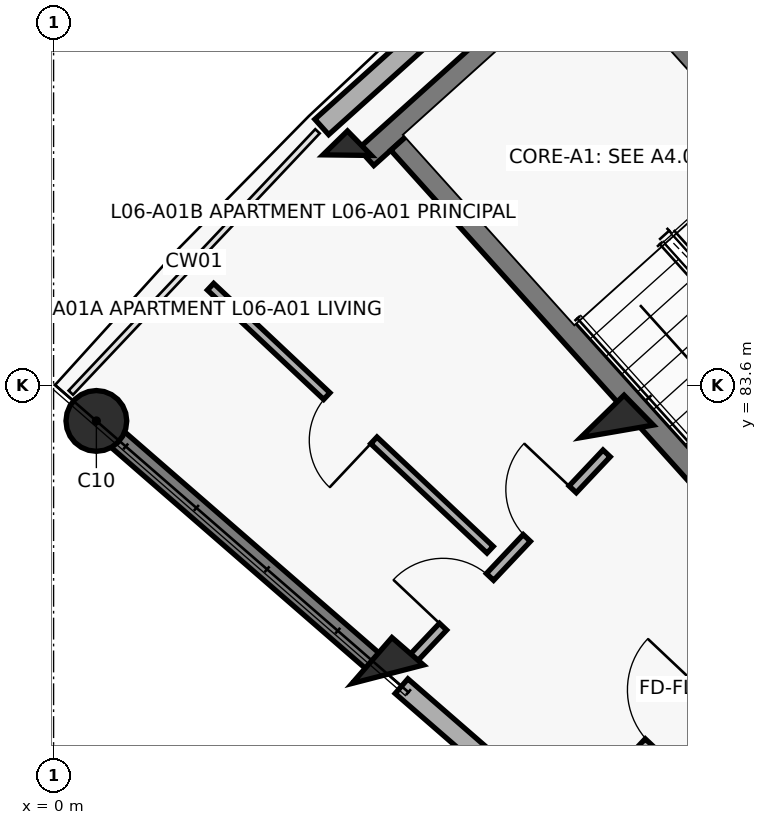
"""IFC4 building model, lengths in metres.
Left out: names, types, materials, properties, quantities, classifications, styles, units other than length and angle.
Written with IfcOpenShell. Run it as: python <this file> out.ifc"""

import sys

from ifc_helpers import new_model, si_unit, direction, frame, frame_2d, origin, origin_2d, place, context, subcontext, project, spatial, rectangle, circle, extrude, element, fill, save


model = new_model("IFC4")
c1 = context("Model", 3, precision=1e-05, world=origin(), true_north=direction((0.0, 1.0)))
c2 = subcontext(c1, "Body", "Model", "MODEL_VIEW")
j1 = project(units=[si_unit("LENGTHUNIT", "METRE"), si_unit("PLANEANGLEUNIT", "RADIAN")], contexts=[c1])
p1 = place(None, origin())
s1 = spatial("IfcSite", under=j1, at=p1, CompositionType="ELEMENT")
p2 = place(p1, origin())
s2 = spatial("IfcBuilding", under=s1, at=p2, CompositionType="ELEMENT")
p3 = place(p2, frame((0.0, 0.0, 20.5)))
s3 = spatial("IfcBuildingStorey", under=s2, at=p3, CompositionType="ELEMENT", Elevation=20.5)
p4 = place(p3, frame((4.397, 79.796, 0.0), z_axis=(0.0, 0.0, 1.0), x_axis=(-0.754709580223, 0.656059028991, 0.0)))
e1 = element("IfcColumn", 1, at=p4, inside=s3, PredefinedType="COLUMN", context=c2, shape_type="SweptSolid", body=[
    extrude(rectangle(XDim=0.55, YDim=0.8, at=origin_2d()), origin(), (0.0, 0.0, 1.0), 3.1),
])
p5 = place(p3, frame((0.563, 83.129, 0.0), z_axis=(0.0, 0.0, 1.0), x_axis=(-0.754709580223, 0.656059028991, 0.0)))
e2 = element("IfcColumn", 2, at=p5, inside=s3, PredefinedType="COLUMN", context=c2, shape_type="SweptSolid", body=[
    extrude(circle(Radius=0.4, at=origin_2d()), origin(), (0.0, 0.0, 1.0), 3.1),
])
p6 = place(p3, frame((7.412, 82.991, 0.0), z_axis=(0.0, 0.0, 1.0), x_axis=(-0.698665066769, 0.715448897181, 0.0)))
e3 = element("IfcColumn", 3, at=p6, inside=s3, PredefinedType="COLUMN", context=c2, shape_type="SweptSolid", body=[
    extrude(rectangle(XDim=0.55, YDim=0.8, at=origin_2d()), origin(), (0.0, 0.0, 1.0), 3.1),
])
p7 = place(p3, frame((3.863, 86.626, 0.0), z_axis=(0.0, 0.0, 1.0), x_axis=(-0.698665066769, 0.715448897181, 0.0)))
e4 = element("IfcColumn", 4, at=p7, inside=s3, PredefinedType="COLUMN", context=c2, shape_type="SweptSolid", body=[
    extrude(rectangle(XDim=0.45, YDim=0.45, at=origin_2d()), origin(), (0.0, 0.0, 1.0), 3.1),
])
p8 = place(p3, frame((4.261, 79.914, 0.0), z_axis=(0.0, 0.0, 1.0), x_axis=(-0.754703505217, 0.65606601742, 0.0)))
e5 = element("IfcWall", 5, at=p8, inside=s3, PredefinedType="SHEAR", context=c2, shape_type="SweptSolid", body=[
    extrude(rectangle(XDim=4.72, YDim=0.27, at=frame_2d((2.36, 0.0))), origin(), (0.0, 0.0, 1.0), 2.86),
])
p9 = place(p3, frame((3.528, 86.997, 0.0), z_axis=(0.0, 0.0, 1.0), x_axis=(0.743387539862, 0.668860946369, 0.0)))
e6 = element("IfcWall", 6, at=p9, inside=s3, PredefinedType="SOLIDWALL", context=c2, shape_type="SweptSolid", body=[
    extrude(rectangle(XDim=4.809, YDim=0.272, at=frame_2d((2.405, 0.0))), origin(), (0.0, 0.0, 1.0), 2.25),
])
p10 = place(p3, frame((10.766, 74.259, 0.0), z_axis=(0.0, 0.0, 1.0), x_axis=(-0.754717680958, 0.656049710044, 0.0)))
e7 = element("IfcWall", 7, at=p10, inside=s3, PredefinedType="SOLIDWALL", context=c2, shape_type="SweptSolid", body=[
    extrude(rectangle(XDim=8.2, YDim=0.255, at=frame_2d((4.1, 0.0))), origin(), (0.0, 0.0, 1.0), 2.18),
])
p11 = place(p10, frame((3.59, 0.0, 0.75)))
e8 = element("IfcOpeningElement", 8, at=p11, cuts=e7, PredefinedType="OPENING", context=c2, shape_type="SweptSolid", body=[
    extrude(rectangle(XDim=1.35, YDim=1.35, at=frame_2d((0.675, 0.675))), frame((0.0, 0.137, 0.0), z_axis=(0.0, -1.0, 0.0), x_axis=(1.0, 0.0, 0.0)), (0.0, 0.0, 1.0), 0.275),
])
p12 = place(p3, frame((7.436, 89.59, 0.0), z_axis=(0.0, 0.0, 1.0), x_axis=(-0.743400052815, -0.668847038922, 0.0)))
e9 = element("IfcWall", 9, at=p12, inside=s3, PredefinedType="SHEAR", context=c2, shape_type="SweptSolid", body=[
    extrude(rectangle(XDim=4.47, YDim=0.3, at=frame_2d((2.235, 0.0))), origin(), (0.0, 0.0, 1.0), 3.1),
])
p13 = place(p3, frame((12.345, 83.461, 0.0), z_axis=(0.0, 0.0, 1.0), x_axis=(-0.668868253964, 0.743380964808, 0.0)))
e10 = element("IfcWall", 10, at=p13, inside=s3, PredefinedType="SHEAR", context=c2, shape_type="SweptSolid", body=[
    extrude(rectangle(XDim=7.69, YDim=0.3, at=frame_2d((3.845, 0.0))), origin(), (0.0, 0.0, 1.0), 3.1),
])
p14 = place(p3, frame((9.691, 81.073, 0.0), z_axis=(0.0, 0.0, 1.0), x_axis=(-0.668885797871, 0.743365179038, 0.0)))
e11 = element("IfcWall", 11, at=p14, inside=s3, PredefinedType="SHEAR", context=c2, shape_type="SweptSolid", body=[
    extrude(rectangle(XDim=7.69, YDim=0.3, at=frame_2d((3.845, 0.0))), origin(), (0.0, 0.0, 1.0), 3.1),
])
p15 = place(p3, frame((7.014, 77.984, 0.0), z_axis=(0.0, 0.0, 1.0), x_axis=(0.686310507227, 0.727308660522, 0.0)))
e12 = element("IfcWall", 12, at=p15, inside=s3, PredefinedType="SOLIDWALL", context=c2, shape_type="SweptSolid", body=[
    extrude(rectangle(XDim=3.436, YDim=0.2, at=frame_2d((1.718, 0.0))), origin(), (0.0, 0.0, 1.0), 2.08),
])
p16 = place(p15, frame((1.228, 0.0, 0.0)))
e13 = element("IfcOpeningElement", 13, at=p16, cuts=e12, PredefinedType="OPENING", context=c2, shape_type="SweptSolid", body=[
    extrude(rectangle(XDim=0.98, YDim=2.15, at=frame_2d((0.49, 1.075))), frame((0.0, 0.11, 0.0), z_axis=(0.0, -1.0, 0.0), x_axis=(1.0, 0.0, 0.0)), (0.0, 0.0, 1.0), 0.22),
])
p17 = place(p3, frame((4.678, 79.948, 0.0), z_axis=(0.0, 0.0, 1.0), x_axis=(0.686331812627, 0.72728855551, 0.0)))
e14 = element("IfcWall", 14, at=p17, inside=s3, PredefinedType="PARTITIONING", context=c2, shape_type="SweptSolid", body=[
    extrude(rectangle(XDim=3.785, YDim=0.13, at=frame_2d((1.893, 0.0))), origin(), (0.0, 0.0, 1.0), 2.08),
])
p18 = place(p17, frame((0.65, 0.0, 0.0)))
e15 = element("IfcOpeningElement", 15, at=p18, cuts=e14, PredefinedType="OPENING", context=c2, shape_type="SweptSolid", body=[
    extrude(rectangle(XDim=0.9, YDim=2.1, at=frame_2d((0.45, 1.05))), frame((0.0, 0.075, 0.0), z_axis=(0.0, -1.0, 0.0), x_axis=(1.0, 0.0, 0.0)), (0.0, 0.0, 1.0), 0.15),
])
p19 = place(p17, frame((2.255, 0.0, 0.0)))
e16 = element("IfcOpeningElement", 16, at=p19, cuts=e14, PredefinedType="OPENING", context=c2, shape_type="SweptSolid", body=[
    extrude(rectangle(XDim=0.88, YDim=2.1, at=frame_2d((0.44, 1.05))), frame((0.0, 0.075, 0.0), z_axis=(0.0, -1.0, 0.0), x_axis=(1.0, 0.0, 0.0)), (0.0, 0.0, 1.0), 0.15),
])
p20 = place(p3, frame((5.743, 81.434, 0.0), z_axis=(0.0, 0.0, 1.0), x_axis=(-0.72831636485, 0.685241032551, 0.0)))
e17 = element("IfcWall", 17, at=p20, inside=s3, PredefinedType="PARTITIONING", context=c2, shape_type="SweptSolid", body=[
    extrude(rectangle(XDim=5.05, YDim=0.12, at=frame_2d((2.525, 0.0))), origin(), (0.0, 0.0, 1.0), 2.08),
])
p21 = place(p20, frame((2.1, 0.0, 0.0)))
e18 = element("IfcOpeningElement", 18, at=p21, cuts=e17, PredefinedType="OPENING", context=c2, shape_type="SweptSolid", body=[
    extrude(rectangle(XDim=0.85, YDim=2.1, at=frame_2d((0.425, 1.05))), frame((0.0, 0.07, 0.0), z_axis=(0.0, -1.0, 0.0), x_axis=(1.0, 0.0, 0.0)), (0.0, 0.0, 1.0), 0.14),
])
p22 = place(p16, origin())
e19 = element("IfcDoor", 19, at=p22, inside=s3, OperationType="SINGLE_SWING_RIGHT", PredefinedType="DOOR", context=c2, shape_type="SweptSolid", body=[
    extrude(rectangle(XDim=0.98, YDim=2.15, at=frame_2d((0.49, 1.075))), frame((0.0, 0.025, 0.0), z_axis=(0.0, -1.0, 0.0), x_axis=(1.0, 0.0, 0.0)), (0.0, 0.0, 1.0), 0.05),
])
fill(e13, e19)
p23 = place(p18, origin())
e20 = element("IfcDoor", 20, at=p23, inside=s3, OperationType="SINGLE_SWING_LEFT", PredefinedType="DOOR", context=c2, shape_type="SweptSolid", body=[
    extrude(rectangle(XDim=0.9, YDim=2.1, at=frame_2d((0.45, 1.05))), frame((0.0, 0.025, 0.0), z_axis=(0.0, -1.0, 0.0), x_axis=(1.0, 0.0, 0.0)), (0.0, 0.0, 1.0), 0.05),
])
fill(e15, e20)
p24 = place(p19, origin())
e21 = element("IfcDoor", 21, at=p24, inside=s3, OperationType="SINGLE_SWING_RIGHT", PredefinedType="DOOR", context=c2, shape_type="SweptSolid", body=[
    extrude(rectangle(XDim=0.88, YDim=2.1, at=frame_2d((0.44, 1.05))), frame((0.0, 0.025, 0.0), z_axis=(0.0, -1.0, 0.0), x_axis=(1.0, 0.0, 0.0)), (0.0, 0.0, 1.0), 0.05),
])
fill(e16, e21)
p25 = place(p21, origin())
e22 = element("IfcDoor", 22, at=p25, inside=s3, OperationType="SINGLE_SWING_LEFT", PredefinedType="DOOR", context=c2, shape_type="SweptSolid", body=[
    extrude(rectangle(XDim=0.85, YDim=2.1, at=frame_2d((0.425, 1.05))), frame((0.0, 0.025, 0.0), z_axis=(0.0, -1.0, 0.0), x_axis=(1.0, 0.0, 0.0)), (0.0, 0.0, 1.0), 0.05),
])
fill(e18, e22)
save(model, sys.argv[1])
